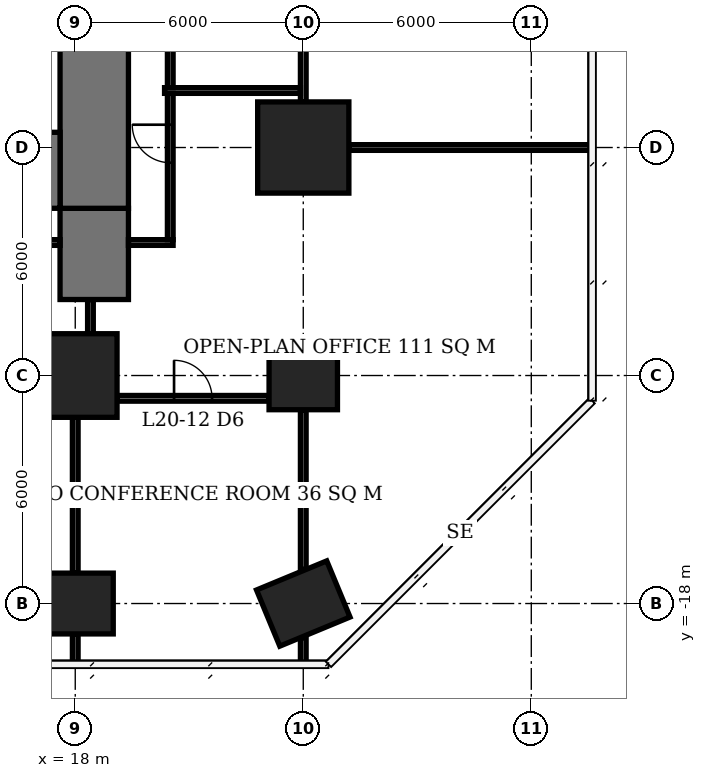
"""IFC4 building model, lengths in metres.
Left out: names, types, materials, properties, quantities, classifications, styles, units other than length and angle.
Written with IfcOpenShell. Run it as: python <this file> out.ifc"""

import sys

from ifc_helpers import new_model, si_unit, direction, frame, frame_2d, origin, origin_2d, place, context, subcontext, project, spatial, rectangle, extrude, element, fill, save


model = new_model("IFC4")
c1 = context("Model", 3, precision=1e-05, world=origin(), true_north=direction((0.0, 1.0)))
c2 = subcontext(c1, "Body", "Model", "MODEL_VIEW")
j1 = project(units=[si_unit("LENGTHUNIT", "METRE"), si_unit("PLANEANGLEUNIT", "RADIAN")], contexts=[c1])
p1 = place(None, origin())
s1 = spatial("IfcSite", under=j1, at=p1, CompositionType="ELEMENT")
p2 = place(p1, origin())
s2 = spatial("IfcBuilding", under=s1, at=p2, CompositionType="ELEMENT")
p3 = place(p2, frame((0.0, 0.0, 84.5)))
s3 = spatial("IfcBuildingStorey", under=s2, at=p3, CompositionType="ELEMENT", Elevation=84.5)
p4 = place(p3, frame((18.0, -18.0, 0.0), z_axis=(0.0, 0.0, 1.0), x_axis=(1.0, 0.0, 0.0)))
e1 = element("IfcColumn", 1, at=p4, inside=s3, PredefinedType="COLUMN", context=c2, shape_type="SweptSolid", body=[
    extrude(rectangle(XDim=2.0, YDim=1.6, at=origin_2d()), origin(), (0.0, 0.0, 1.0), 3.9),
])
p5 = place(p3, frame((18.0, -12.0, 0.0), z_axis=(0.0, 0.0, 1.0), x_axis=(1.0, 0.0, 0.0)))
e2 = element("IfcColumn", 2, at=p5, inside=s3, PredefinedType="COLUMN", context=c2, shape_type="SweptSolid", body=[
    extrude(rectangle(XDim=2.2, YDim=2.2, at=origin_2d()), origin(), (0.0, 0.0, 1.0), 3.9),
])
p6 = place(p3, frame((24.0, -18.0, 0.0), z_axis=(0.0, 0.0, 1.0), x_axis=(-0.923879532511, -0.382683432365, 0.0)))
e3 = element("IfcColumn", 3, at=p6, inside=s3, PredefinedType="COLUMN", context=c2, shape_type="SweptSolid", body=[
    extrude(rectangle(XDim=2.0, YDim=1.6, at=origin_2d()), origin(), (0.0, 0.0, 1.0), 3.9),
])
p7 = place(p3, frame((24.0, -12.0, 0.0), z_axis=(0.0, 0.0, 1.0), x_axis=(1.0, 0.0, 0.0)))
e4 = element("IfcColumn", 4, at=p7, inside=s3, PredefinedType="COLUMN", context=c2, shape_type="SweptSolid", body=[
    extrude(rectangle(XDim=1.8, YDim=1.8, at=origin_2d()), origin(), (0.0, 0.0, 1.0), 3.9),
])
p8 = place(p3, frame((24.0, -6.0, 0.0), z_axis=(0.0, 0.0, 1.0), x_axis=(1.0, 0.0, 0.0)))
e5 = element("IfcColumn", 5, at=p8, inside=s3, PredefinedType="COLUMN", context=c2, shape_type="SweptSolid", body=[
    extrude(rectangle(XDim=2.4, YDim=2.4, at=origin_2d()), origin(), (0.0, 0.0, 1.0), 3.9),
])
p9 = place(p3, frame((-5.6, -6.6, 0.0), z_axis=(0.0, 0.0, 1.0), x_axis=(1.0, 0.0, 0.0)))
e6 = element("IfcWall", 6, at=p9, inside=s3, PredefinedType="SHEAR", context=c2, shape_type="SweptSolid", body=[
    extrude(rectangle(XDim=23.2, YDim=2.0, at=frame_2d((11.6, 0.0))), origin(), (0.0, 0.0, 1.0), 3.9),
])
p10 = place(p3, frame((18.5, -7.6, 0.0), z_axis=(0.0, 0.0, 1.0), x_axis=(0.0, 1.0, 0.0)))
e7 = element("IfcWall", 7, at=p10, inside=s3, PredefinedType="SHEAR", context=c2, shape_type="SweptSolid", body=[
    extrude(rectangle(XDim=21.2, YDim=1.8, at=frame_2d((10.6, 0.0))), origin(), (0.0, 0.0, 1.0), 3.9),
])
p11 = place(p10, frame((9.2, 0.0, 0.0)))
e8 = element("IfcOpeningElement", 8, at=p11, cuts=e7, PredefinedType="OPENING", context=c2, shape_type="SweptSolid", body=[
    extrude(rectangle(XDim=1.8, YDim=2.4, at=frame_2d((0.9, 1.2))), frame((0.0, 0.91, 0.0), z_axis=(0.0, -1.0, 0.0), x_axis=(1.0, 0.0, 0.0)), (0.0, 0.0, 1.0), 1.82),
])
p12 = place(p3, frame((18.5, -10.0, 0.0), z_axis=(0.0, 0.0, 1.0), x_axis=(0.0, 1.0, 0.0)))
e9 = element("IfcWall", 9, at=p12, inside=s3, PredefinedType="SHEAR", context=c2, shape_type="SweptSolid", body=[
    extrude(rectangle(XDim=2.4, YDim=1.8, at=frame_2d((1.2, 0.0))), origin(), (0.0, 0.0, 1.0), 3.9),
])
p13 = place(p3, frame((19.1, -12.6, 0.0), z_axis=(0.0, 0.0, 1.0), x_axis=(1.0, 0.0, 0.0)))
e10 = element("IfcWall", 10, at=p13, inside=s3, PredefinedType="PARTITIONING", context=c2, shape_type="SweptSolid", body=[
    extrude(rectangle(XDim=4.0, YDim=0.15, at=frame_2d((2.0, 0.0))), origin(), (0.0, 0.0, 1.0), 3.65),
])
p14 = place(p13, frame((1.5, 0.0, 0.0)))
e11 = element("IfcOpeningElement", 11, at=p14, cuts=e10, PredefinedType="OPENING", context=c2, shape_type="SweptSolid", body=[
    extrude(rectangle(XDim=1.0, YDim=2.1, at=frame_2d((0.5, 1.05))), frame((0.0, 0.085, 0.0), z_axis=(0.0, -1.0, 0.0), x_axis=(1.0, 0.0, 0.0)), (0.0, 0.0, 1.0), 0.17),
])
p15 = place(p3, frame((25.2, -6.0, 0.0), z_axis=(0.0, 0.0, 1.0), x_axis=(1.0, 0.0, 0.0)))
e12 = element("IfcWall", 12, at=p15, inside=s3, PredefinedType="PARTITIONING", context=c2, shape_type="SweptSolid", body=[
    extrude(rectangle(XDim=6.4, YDim=0.15, at=frame_2d((3.2, 0.0))), origin(), (0.0, 0.0, 1.0), 3.65),
])
p16 = place(p3, frame((18.0, -19.6, 0.0), z_axis=(0.0, 0.0, 1.0), x_axis=(0.0, 1.0, 0.0)))
e13 = element("IfcWall", 13, at=p16, inside=s3, PredefinedType="PARTITIONING", context=c2, shape_type="SweptSolid", body=[
    extrude(rectangle(XDim=0.8, YDim=0.15, at=frame_2d((0.4, 0.0))), origin(), (0.0, 0.0, 1.0), 3.65),
])
p17 = place(p3, frame((18.0, -17.2, 0.0), z_axis=(0.0, 0.0, 1.0), x_axis=(0.0, 1.0, 0.0)))
e14 = element("IfcWall", 14, at=p17, inside=s3, PredefinedType="PARTITIONING", context=c2, shape_type="SweptSolid", body=[
    extrude(rectangle(XDim=4.1, YDim=0.15, at=frame_2d((2.05, 0.0))), origin(), (0.0, 0.0, 1.0), 3.65),
])
p18 = place(p3, frame((24.0, -19.6, 0.0), z_axis=(0.0, 0.0, 1.0), x_axis=(0.0, 1.0, 0.0)))
e15 = element("IfcWall", 15, at=p18, inside=s3, PredefinedType="PARTITIONING", context=c2, shape_type="SweptSolid", body=[
    extrude(rectangle(XDim=0.703, YDim=0.15, at=frame_2d((0.352, 0.0))), origin(), (0.0, 0.0, 1.0), 3.65),
])
p19 = place(p3, frame((24.0, -17.103, 0.0), z_axis=(0.0, 0.0, 1.0), x_axis=(0.0, 1.0, 0.0)))
e16 = element("IfcWall", 16, at=p19, inside=s3, PredefinedType="PARTITIONING", context=c2, shape_type="SweptSolid", body=[
    extrude(rectangle(XDim=4.203, YDim=0.15, at=frame_2d((2.102, 0.0))), origin(), (0.0, 0.0, 1.0), 3.65),
])
p20 = place(p3, frame((24.0, -4.8, 0.0), z_axis=(0.0, 0.0, 1.0), x_axis=(0.0, 1.0, 0.0)))
e17 = element("IfcWall", 17, at=p20, inside=s3, PredefinedType="PARTITIONING", context=c2, shape_type="SweptSolid", body=[
    extrude(rectangle(XDim=3.8, YDim=0.15, at=frame_2d((1.9, 0.0))), origin(), (0.0, 0.0, 1.0), 3.65),
])
p21 = place(p20, frame((1.4, 0.0, 0.0)))
e18 = element("IfcOpeningElement", 18, at=p21, cuts=e17, PredefinedType="OPENING", context=c2, shape_type="SweptSolid", body=[
    extrude(rectangle(XDim=1.0, YDim=2.1, at=frame_2d((0.5, 1.05))), frame((0.0, 0.085, 0.0), z_axis=(0.0, -1.0, 0.0), x_axis=(1.0, 0.0, 0.0)), (0.0, 0.0, 1.0), 0.17),
])
p22 = place(p3, frame((17.6, -8.5, 0.0), z_axis=(0.0, 0.0, 1.0), x_axis=(-1.0, 0.0, 0.0)))
e19 = element("IfcWall", 19, at=p22, inside=s3, PredefinedType="PARTITIONING", context=c2, shape_type="SweptSolid", body=[
    extrude(rectangle(XDim=10.025, YDim=0.15, at=frame_2d((5.013, 0.0))), origin(), (0.0, 0.0, 1.0), 3.65),
])
p23 = place(p22, frame((6.065, 0.0, 0.0)))
e20 = element("IfcOpeningElement", 20, at=p23, cuts=e19, PredefinedType="OPENING", context=c2, shape_type="SweptSolid", body=[
    extrude(rectangle(XDim=1.0, YDim=2.1, at=frame_2d((0.5, 1.05))), frame((0.0, 0.085, 0.0), z_axis=(0.0, -1.0, 0.0), x_axis=(1.0, 0.0, 0.0)), (0.0, 0.0, 1.0), 0.17),
])
p24 = place(p3, frame((18.4, -10.9, 0.0), z_axis=(0.0, 0.0, 1.0), x_axis=(0.0, 1.0, 0.0)))
e21 = element("IfcWall", 21, at=p24, inside=s3, PredefinedType="PARTITIONING", context=c2, shape_type="SweptSolid", body=[
    extrude(rectangle(XDim=0.9, YDim=0.15, at=frame_2d((0.45, 0.0))), origin(), (0.0, 0.0, 1.0), 3.65),
])
p25 = place(p3, frame((19.4, -8.5, 0.0), z_axis=(0.0, 0.0, 1.0), x_axis=(1.0, 0.0, 0.0)))
e22 = element("IfcWall", 22, at=p25, inside=s3, PredefinedType="PARTITIONING", context=c2, shape_type="SweptSolid", body=[
    extrude(rectangle(XDim=1.175, YDim=0.15, at=frame_2d((0.587, 0.0))), origin(), (0.0, 0.0, 1.0), 3.65),
])
p26 = place(p3, frame((20.5, -8.425, 0.0), z_axis=(0.0, 0.0, 1.0), x_axis=(0.0, 1.0, 0.0)))
e23 = element("IfcWall", 23, at=p26, inside=s3, PredefinedType="PARTITIONING", context=c2, shape_type="SweptSolid", body=[
    extrude(rectangle(XDim=3.85, YDim=0.15, at=frame_2d((1.925, 0.0))), origin(), (0.0, 0.0, 1.0), 3.65),
])
p27 = place(p26, frame((2.025, 0.0, 0.0)))
e24 = element("IfcOpeningElement", 24, at=p27, cuts=e23, PredefinedType="OPENING", context=c2, shape_type="SweptSolid", body=[
    extrude(rectangle(XDim=1.0, YDim=2.1, at=frame_2d((0.5, 1.05))), frame((0.0, 0.085, 0.0), z_axis=(0.0, -1.0, 0.0), x_axis=(1.0, 0.0, 0.0)), (0.0, 0.0, 1.0), 0.17),
])
p28 = place(p3, frame((20.5, -4.425, 0.0), z_axis=(0.0, 0.0, 1.0), x_axis=(0.0, 1.0, 0.0)))
e25 = element("IfcWall", 25, at=p28, inside=s3, PredefinedType="PARTITIONING", context=c2, shape_type="SweptSolid", body=[
    extrude(rectangle(XDim=14.85, YDim=0.15, at=frame_2d((7.425, 0.0))), origin(), (0.0, 0.0, 1.0), 3.65),
])
p29 = place(p28, frame((9.175, 0.0, 0.0)))
e26 = element("IfcOpeningElement", 26, at=p29, cuts=e25, PredefinedType="OPENING", context=c2, shape_type="SweptSolid", body=[
    extrude(rectangle(XDim=1.0, YDim=2.1, at=frame_2d((0.5, 1.05))), frame((0.0, 0.085, 0.0), z_axis=(0.0, -1.0, 0.0), x_axis=(1.0, 0.0, 0.0)), (0.0, 0.0, 1.0), 0.17),
])
p30 = place(p3, frame((20.35, -4.5, 0.0), z_axis=(0.0, 0.0, 1.0), x_axis=(1.0, 0.0, 0.0)))
e27 = element("IfcWall", 27, at=p30, inside=s3, PredefinedType="PARTITIONING", context=c2, shape_type="SweptSolid", body=[
    extrude(rectangle(XDim=3.575, YDim=0.15, at=frame_2d((1.788, 0.0))), origin(), (0.0, 0.0, 1.0), 3.65),
])
p31 = place(p14, origin())
e28 = element("IfcDoor", 28, at=p31, inside=s3, OperationType="SINGLE_SWING_LEFT", PredefinedType="DOOR", context=c2, shape_type="SweptSolid", body=[
    extrude(rectangle(XDim=1.0, YDim=2.1, at=frame_2d((0.5, 1.05))), frame((0.0, 0.025, 0.0), z_axis=(0.0, -1.0, 0.0), x_axis=(1.0, 0.0, 0.0)), (0.0, 0.0, 1.0), 0.05),
])
fill(e11, e28)
p32 = place(p27, origin())
e29 = element("IfcDoor", 29, at=p32, inside=s3, OperationType="SINGLE_SWING_RIGHT", PredefinedType="DOOR", context=c2, shape_type="SweptSolid", body=[
    extrude(rectangle(XDim=1.0, YDim=2.1, at=frame_2d((0.5, 1.05))), frame((0.0, 0.025, 0.0), z_axis=(0.0, -1.0, 0.0), x_axis=(1.0, 0.0, 0.0)), (0.0, 0.0, 1.0), 0.05),
])
fill(e24, e29)
save(model, sys.argv[1])
